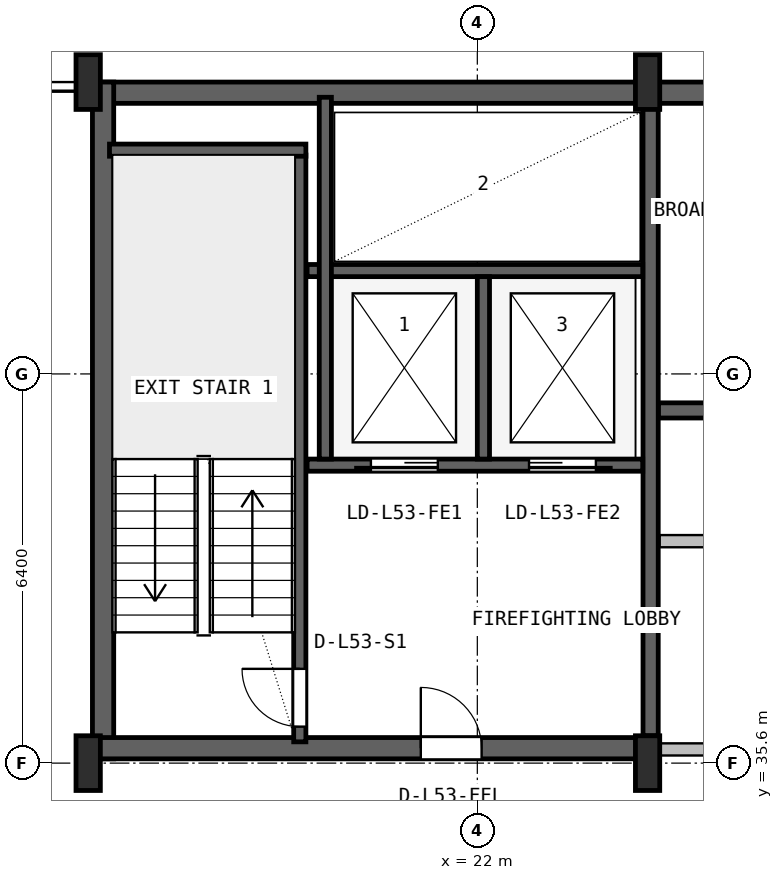
"""IFC4 building model, lengths in metres.
Left out: names, types, materials, properties, quantities, classifications, styles, units other than length and angle.
Written with IfcOpenShell. Run it as: python <this file> out.ifc"""

import sys

from ifc_helpers import new_model, si_unit, direction, frame, frame_2d, origin, origin_2d, place, context, subcontext, project, spatial, rectangle, i_section, extrude, source, transform, mapped, element, fill, save


model = new_model("IFC4")
c1 = context("Model", 3, precision=1e-05, world=origin(), true_north=direction((0.0, 1.0)))
c2 = subcontext(c1, "Body", "Model", "MODEL_VIEW")
j1 = project(units=[si_unit("LENGTHUNIT", "METRE"), si_unit("PLANEANGLEUNIT", "RADIAN")], contexts=[c1])
p1 = place(None, origin())
s1 = spatial("IfcSite", under=j1, at=p1, CompositionType="ELEMENT")
p2 = place(p1, origin())
s2 = spatial("IfcBuilding", under=s1, at=p2, CompositionType="ELEMENT")
p3 = place(p2, frame((0.0, 0.0, 215.0)))
s3 = spatial("IfcBuildingStorey", under=s2, at=p3, CompositionType="ELEMENT", Elevation=215.0)
p4 = place(p3, frame((15.6, 46.625, 0.0), z_axis=(0.0, 0.0, 1.0), x_axis=(1.0, 0.0, 0.0)))
e1 = element("IfcWall", 1, at=p4, inside=s3, PredefinedType="SHEAR", context=c2, shape_type="SweptSolid", body=[
    extrude(rectangle(XDim=36.8, YDim=0.35, at=frame_2d((18.4, 0.0))), origin(), (0.0, 0.0, 1.0), 3.55),
])
p5 = place(p3, frame((15.845, 35.67, 0.0), z_axis=(0.0, 0.0, 1.0), x_axis=(0.0, 1.0, 0.0)))
e2 = element("IfcWall", 2, at=p5, inside=s3, PredefinedType="SHEAR", context=c2, shape_type="SweptSolid", body=[
    extrude(rectangle(XDim=11.13, YDim=0.35, at=frame_2d((5.565, 0.0))), origin(), (0.0, 0.0, 1.0), 3.55),
])
p6 = place(p3, frame((15.67, 35.845, 0.0), z_axis=(0.0, 0.0, 1.0), x_axis=(1.0, 0.0, 0.0)))
e3 = element("IfcWall", 3, at=p6, inside=s3, PredefinedType="SHEAR", context=c2, shape_type="SweptSolid", body=[
    extrude(rectangle(XDim=9.13, YDim=0.35, at=frame_2d((4.565, 0.0))), origin(), (0.0, 0.0, 1.0), 3.55),
])
p7 = place(p6, frame((5.4, 0.0, 0.0)))
e4 = element("IfcOpeningElement", 4, at=p7, cuts=e3, PredefinedType="OPENING", context=c2, shape_type="SweptSolid", body=[
    extrude(rectangle(XDim=1.0, YDim=2.1, at=frame_2d((0.5, 1.05))), frame((0.0, 0.185, 0.0), z_axis=(0.0, -1.0, 0.0), x_axis=(1.0, 0.0, 0.0)), (0.0, 0.0, 1.0), 0.37),
])
m1 = source(origin(), c2, "Body", "SweptSolid", [
    extrude(i_section(OverallWidth=0.4, OverallDepth=0.9, WebThickness=0.016, FlangeThickness=0.028, FilletRadius=0.016, at=origin_2d()), origin(), (0.0, 0.0, 1.0), 3.8),
])
for number, where, z_axis, x_axis in (
    (5, (15.6, 35.6, 0.0), (0.0, 0.0, 1.0), (1.0, 0.0, 0.0)),
    (6, (15.6, 46.8, 0.0), (0.0, 0.0, 1.0), (1.0, 0.0, 0.0)),
    (7, (24.8, 35.6, 0.0), (0.0, 0.0, 1.0), (1.0, 0.0, 0.0)),
    (8, (24.8, 46.8, 0.0), (0.0, 0.0, 1.0), (1.0, 0.0, 0.0)),
):
    element("IfcColumn", number, at=place(p3, frame(where, z_axis=z_axis, x_axis=x_axis)), inside=s3, PredefinedType="COLUMN", context=c2, shape_type="MappedRepresentation", body=[
        mapped(m1, transform((0.0, 0.0, 0.0), x_axis=(1.0, 0.0, 0.0), y_axis=(0.0, 1.0, 0.0), z_axis=(0.0, 0.0, 1.0), scale=1.0)),
    ])
p8 = place(p3, frame((19.08, 35.95, 0.0), z_axis=(0.0, 0.0, 1.0), x_axis=(0.0, 1.0, 0.0)))
e9 = element("IfcWall", 9, at=p8, inside=s3, PredefinedType="SHEAR", context=c2, shape_type="SweptSolid", body=[
    extrude(rectangle(XDim=9.65, YDim=0.2, at=frame_2d((4.825, 0.0))), origin(), (0.0, 0.0, 1.0), 3.55),
])
p9 = place(p8, frame((0.25, 0.0, 0.0)))
e10 = element("IfcOpeningElement", 10, at=p9, cuts=e9, PredefinedType="OPENING", context=c2, shape_type="SweptSolid", body=[
    extrude(rectangle(XDim=0.95, YDim=2.1, at=frame_2d((0.475, 1.05))), frame((0.0, 0.11, 0.0), z_axis=(0.0, -1.0, 0.0), x_axis=(1.0, 0.0, 0.0)), (0.0, 0.0, 1.0), 0.22),
])
p10 = place(p3, frame((15.95, 45.68, 0.0), z_axis=(0.0, 0.0, 1.0), x_axis=(1.0, 0.0, 0.0)))
e11 = element("IfcWall", 11, at=p10, inside=s3, PredefinedType="SHEAR", context=c2, shape_type="SweptSolid", body=[
    extrude(rectangle(XDim=3.23, YDim=0.2, at=frame_2d((1.615, 0.0))), origin(), (0.0, 0.0, 1.0), 3.55),
])
p11 = place(p3, frame((24.85, 36.05, 0.0), z_axis=(0.0, 0.0, 1.0), x_axis=(0.0, 1.0, 0.0)))
e12 = element("IfcWall", 12, at=p11, inside=s3, PredefinedType="SHEAR", context=c2, shape_type="SweptSolid", body=[
    extrude(rectangle(XDim=10.45, YDim=0.25, at=frame_2d((5.225, 0.0))), origin(), (0.0, 0.0, 1.0), 3.55),
])
p12 = place(p3, frame((19.2, 40.5, 0.0), z_axis=(0.0, 0.0, 1.0), x_axis=(1.0, 0.0, 0.0)))
e13 = element("IfcWall", 13, at=p12, inside=s3, PredefinedType="SHEAR", context=c2, shape_type="SweptSolid", body=[
    extrude(rectangle(XDim=5.52, YDim=0.2, at=frame_2d((2.76, 0.0))), origin(), (0.0, 0.0, 1.0), 3.55),
])
p13 = place(p12, frame((1.05, 0.0, 0.0)))
e14 = element("IfcOpeningElement", 14, at=p13, cuts=e13, PredefinedType="OPENING", context=c2, shape_type="SweptSolid", body=[
    extrude(rectangle(XDim=1.1, YDim=2.18, at=frame_2d((0.55, 1.09))), frame((0.0, 0.11, 0.0), z_axis=(0.0, -1.0, 0.0), x_axis=(1.0, 0.0, 0.0)), (0.0, 0.0, 1.0), 0.22),
])
p14 = place(p12, frame((3.65, 0.0, 0.0)))
e15 = element("IfcOpeningElement", 15, at=p14, cuts=e13, PredefinedType="OPENING", context=c2, shape_type="SweptSolid", body=[
    extrude(rectangle(XDim=1.1, YDim=2.18, at=frame_2d((0.55, 1.09))), frame((0.0, 0.11, 0.0), z_axis=(0.0, -1.0, 0.0), x_axis=(1.0, 0.0, 0.0)), (0.0, 0.0, 1.0), 0.22),
])
p15 = place(p3, frame((19.2, 43.7, 0.0), z_axis=(0.0, 0.0, 1.0), x_axis=(1.0, 0.0, 0.0)))
e16 = element("IfcWall", 16, at=p15, inside=s3, PredefinedType="SHEAR", context=c2, shape_type="SweptSolid", body=[
    extrude(rectangle(XDim=5.52, YDim=0.2, at=frame_2d((2.76, 0.0))), origin(), (0.0, 0.0, 1.0), 3.55),
])
p16 = place(p3, frame((22.1, 40.6, 0.0), z_axis=(0.0, 0.0, 1.0), x_axis=(0.0, 1.0, 0.0)))
e17 = element("IfcWall", 17, at=p16, inside=s3, PredefinedType="SHEAR", context=c2, shape_type="SweptSolid", body=[
    extrude(rectangle(XDim=3.0, YDim=0.2, at=frame_2d((1.5, 0.0))), origin(), (0.0, 0.0, 1.0), 3.55),
])
p17 = place(p3, frame((19.5, 40.6, 0.0), z_axis=(0.0, 0.0, 1.0), x_axis=(0.0, 1.0, 0.0)))
e18 = element("IfcWall", 18, at=p17, inside=s3, PredefinedType="SHEAR", context=c2, shape_type="SweptSolid", body=[
    extrude(rectangle(XDim=5.95, YDim=0.2, at=frame_2d((2.975, 0.0))), origin(), (0.0, 0.0, 1.0), 3.55),
])
p18 = place(p3, frame((24.98, 41.4, 0.0), z_axis=(0.0, 0.0, 1.0), x_axis=(1.0, 0.0, 0.0)))
e19 = element("IfcWall", 19, at=p18, inside=s3, PredefinedType="SHEAR", context=c2, shape_type="SweptSolid", body=[
    extrude(rectangle(XDim=23.82, YDim=0.25, at=frame_2d((11.91, 0.0))), origin(), (0.0, 0.0, 1.0), 3.55),
])
p19 = place(p18, frame((16.87, 0.0, 0.0)))
e20 = element("IfcOpeningElement", 20, at=p19, cuts=e19, PredefinedType="OPENING", context=c2, shape_type="SweptSolid", body=[
    extrude(rectangle(XDim=1.1, YDim=2.18, at=frame_2d((0.55, 1.09))), frame((0.0, 0.135, 0.0), z_axis=(0.0, -1.0, 0.0), x_axis=(1.0, 0.0, 0.0)), (0.0, 0.0, 1.0), 0.27),
])
p20 = place(p18, frame((19.47, 0.0, 0.0)))
e21 = element("IfcOpeningElement", 21, at=p20, cuts=e19, PredefinedType="OPENING", context=c2, shape_type="SweptSolid", body=[
    extrude(rectangle(XDim=1.1, YDim=2.18, at=frame_2d((0.55, 1.09))), frame((0.0, 0.135, 0.0), z_axis=(0.0, -1.0, 0.0), x_axis=(1.0, 0.0, 0.0)), (0.0, 0.0, 1.0), 0.27),
])
p21 = place(p18, frame((22.07, 0.0, 0.0)))
e22 = element("IfcOpeningElement", 22, at=p21, cuts=e19, PredefinedType="OPENING", context=c2, shape_type="SweptSolid", body=[
    extrude(rectangle(XDim=1.1, YDim=2.18, at=frame_2d((0.55, 1.09))), frame((0.0, 0.135, 0.0), z_axis=(0.0, -1.0, 0.0), x_axis=(1.0, 0.0, 0.0)), (0.0, 0.0, 1.0), 0.27),
])
p22 = place(p18, frame((3.56, 0.0, 0.0)))
e23 = element("IfcOpeningElement", 23, at=p22, cuts=e19, PredefinedType="OPENING", context=c2, shape_type="SweptSolid", body=[
    extrude(rectangle(XDim=1.0, YDim=2.08, at=frame_2d((0.5, 1.04))), frame((0.0, 0.135, 0.0), z_axis=(0.0, -1.0, 0.0), x_axis=(1.0, 0.0, 0.0)), (0.0, 0.0, 1.0), 0.27),
])
p23 = place(p18, frame((9.76, 0.0, 0.0)))
e24 = element("IfcOpeningElement", 24, at=p23, cuts=e19, PredefinedType="OPENING", context=c2, shape_type="SweptSolid", body=[
    extrude(rectangle(XDim=0.92, YDim=2.08, at=frame_2d((0.46, 1.04))), frame((0.0, 0.135, 0.0), z_axis=(0.0, -1.0, 0.0), x_axis=(1.0, 0.0, 0.0)), (0.0, 0.0, 1.0), 0.27),
])
p24 = place(p18, frame((13.66, 0.0, 0.0)))
e25 = element("IfcOpeningElement", 25, at=p24, cuts=e19, PredefinedType="OPENING", context=c2, shape_type="SweptSolid", body=[
    extrude(rectangle(XDim=0.92, YDim=2.08, at=frame_2d((0.46, 1.04))), frame((0.0, 0.135, 0.0), z_axis=(0.0, -1.0, 0.0), x_axis=(1.0, 0.0, 0.0)), (0.0, 0.0, 1.0), 0.27),
])
p25 = place(p3, frame((25.0, 35.825, 0.0), z_axis=(0.0, 0.0, 1.0), x_axis=(1.0, 0.0, 0.0)))
e26 = element("IfcWall", 26, at=p25, inside=s3, PredefinedType="PLUMBINGWALL", context=c2, shape_type="SweptSolid", body=[
    extrude(rectangle(XDim=9.75, YDim=0.2, at=frame_2d((4.875, 0.0))), origin(), (0.0, 0.0, 1.0), 2.575),
])
p26 = place(p3, frame((25.0, 39.25, 0.0), z_axis=(0.0, 0.0, 1.0), x_axis=(1.0, 0.0, 0.0)))
e27 = element("IfcWall", 27, at=p26, inside=s3, PredefinedType="PLUMBINGWALL", context=c2, shape_type="SweptSolid", body=[
    extrude(rectangle(XDim=9.75, YDim=0.2, at=frame_2d((4.875, 0.0))), origin(), (0.0, 0.0, 1.0), 3.53),
])
p27 = place(p26, frame((1.75, 0.0, 0.0)))
e28 = element("IfcOpeningElement", 28, at=p27, cuts=e27, PredefinedType="OPENING", context=c2, shape_type="SweptSolid", body=[
    extrude(rectangle(XDim=0.9, YDim=2.06, at=frame_2d((0.45, 1.03))), frame((0.0, 0.11, 0.0), z_axis=(0.0, -1.0, 0.0), x_axis=(1.0, 0.0, 0.0)), (0.0, 0.0, 1.0), 0.22),
])
p28 = place(p26, frame((6.725, 0.0, 0.0)))
e29 = element("IfcOpeningElement", 29, at=p28, cuts=e27, PredefinedType="OPENING", context=c2, shape_type="SweptSolid", body=[
    extrude(rectangle(XDim=0.9, YDim=2.06, at=frame_2d((0.45, 1.03))), frame((0.0, 0.11, 0.0), z_axis=(0.0, -1.0, 0.0), x_axis=(1.0, 0.0, 0.0)), (0.0, 0.0, 1.0), 0.22),
])
m2 = source(origin(), c2, "Body", "SweptSolid", [
    extrude(rectangle(XDim=0.95, YDim=2.1, at=frame_2d((0.475, 1.05))), frame((0.0, 0.025, 0.0), z_axis=(0.0, -1.0, 0.0), x_axis=(1.0, 0.0, 0.0)), (0.0, 0.0, 1.0), 0.05),
])
p29 = place(p9, origin())
e30 = element("IfcDoor", 30, at=p29, inside=s3, OperationType="SINGLE_SWING_RIGHT", PredefinedType="DOOR", context=c2, shape_type="MappedRepresentation", body=[
    mapped(m2, transform((0.0, 0.0, 0.0), x_axis=(1.0, 0.0, 0.0), y_axis=(0.0, 1.0, 0.0), z_axis=(0.0, 0.0, 1.0), scale=1.0)),
])
fill(e10, e30)
m3 = source(origin(), c2, "Body", "SweptSolid", [
    extrude(rectangle(XDim=1.0, YDim=2.1, at=frame_2d((0.5, 1.05))), frame((0.0, 0.025, 0.0), z_axis=(0.0, -1.0, 0.0), x_axis=(1.0, 0.0, 0.0)), (0.0, 0.0, 1.0), 0.05),
])
p30 = place(p7, origin())
e31 = element("IfcDoor", 31, at=p30, inside=s3, OperationType="SINGLE_SWING_LEFT", PredefinedType="DOOR", context=c2, shape_type="MappedRepresentation", body=[
    mapped(m3, transform((0.0, 0.0, 0.0), x_axis=(1.0, 0.0, 0.0), y_axis=(0.0, 1.0, 0.0), z_axis=(0.0, 0.0, 1.0), scale=1.0)),
])
fill(e4, e31)
m4 = source(origin(), c2, "Body", "SweptSolid", [
    extrude(rectangle(XDim=1.1, YDim=2.18, at=frame_2d((0.55, 1.09))), frame((0.0, 0.025, 0.0), z_axis=(0.0, -1.0, 0.0), x_axis=(1.0, 0.0, 0.0)), (0.0, 0.0, 1.0), 0.05),
])
p31 = place(p13, frame((1.1, 0.0, 0.0), z_axis=(0.0, 0.0, 1.0), x_axis=(-1.0, 0.0, 0.0)))
e32 = element("IfcDoor", 32, at=p31, inside=s3, OperationType="SLIDING_TO_LEFT", PredefinedType="DOOR", context=c2, shape_type="MappedRepresentation", body=[
    mapped(m4, transform((0.0, 0.0, 0.0), x_axis=(1.0, 0.0, 0.0), y_axis=(0.0, 1.0, 0.0), z_axis=(0.0, 0.0, 1.0), scale=1.0)),
])
fill(e14, e32)
p32 = place(p14, frame((1.1, 0.0, 0.0), z_axis=(0.0, 0.0, 1.0), x_axis=(-1.0, 0.0, 0.0)))
e33 = element("IfcDoor", 33, at=p32, inside=s3, OperationType="SLIDING_TO_RIGHT", PredefinedType="DOOR", context=c2, shape_type="MappedRepresentation", body=[
    mapped(m4, transform((0.0, 0.0, 0.0), x_axis=(1.0, 0.0, 0.0), y_axis=(0.0, 1.0, 0.0), z_axis=(0.0, 0.0, 1.0), scale=1.0)),
])
fill(e15, e33)
save(model, sys.argv[1])
